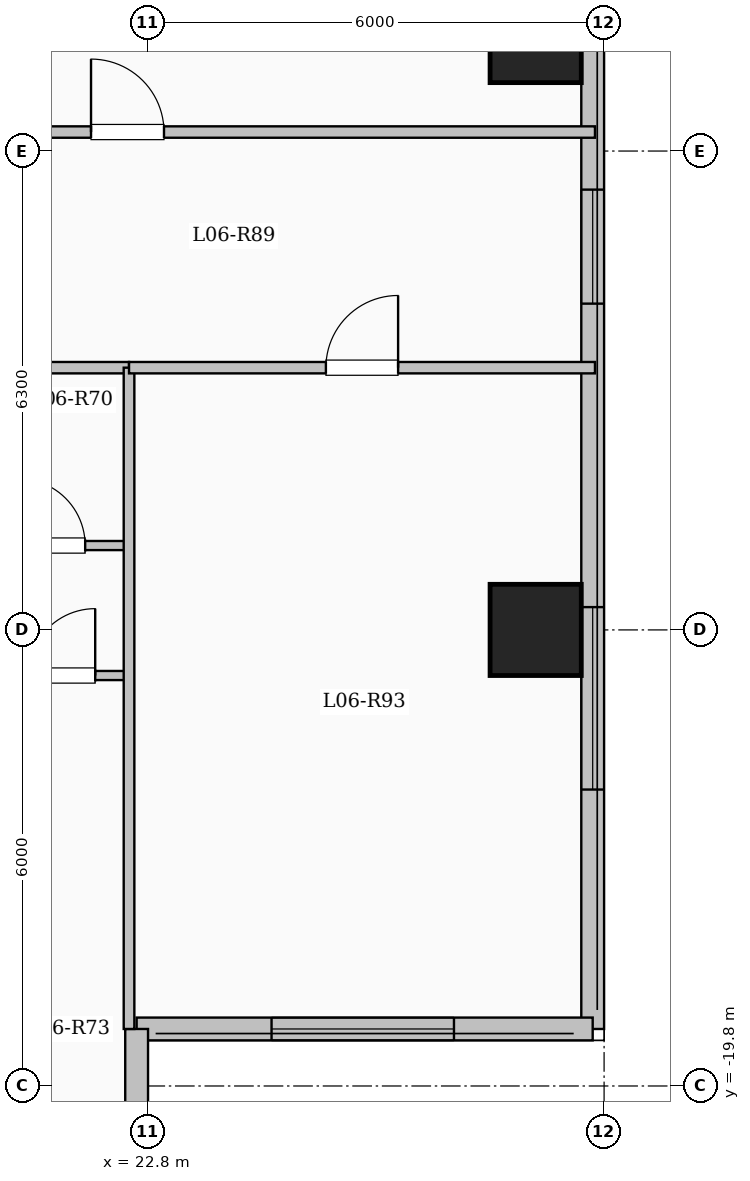
"""IFC4 building model, lengths in metres.
Left out: names, types, materials, properties, quantities, classifications, styles, units other than length and angle.
Written with IfcOpenShell. Run it as: python <this file> out.ifc"""

import sys

from ifc_helpers import new_model, si_unit, direction, frame, frame_2d, origin, origin_2d, place, context, subcontext, project, spatial, rectangle, extrude, element, fill, save


model = new_model("IFC4")
c1 = context("Model", 3, precision=1e-05, world=origin(), true_north=direction((0.0, 1.0)))
c2 = subcontext(c1, "Body", "Model", "MODEL_VIEW")
j1 = project(units=[si_unit("LENGTHUNIT", "METRE"), si_unit("PLANEANGLEUNIT", "RADIAN")], contexts=[c1])
p1 = place(None, origin())
s1 = spatial("IfcSite", under=j1, at=p1, CompositionType="ELEMENT")
p2 = place(p1, origin())
s2 = spatial("IfcBuilding", under=s1, at=p2, CompositionType="ELEMENT")
p3 = place(p2, frame((0.0, 0.0, 27.35)))
s3 = spatial("IfcBuildingStorey", under=s2, at=p3, CompositionType="ELEMENT", Elevation=27.35)
for number, where, z_axis, x_axis in (
    (1, (27.9, -13.8, 0.0), (0.0, 0.0, 1.0), (1.0, 0.0, 0.0)),
    (2, (27.9, -6.0, 0.0), (0.0, 0.0, 1.0), (1.0, 0.0, 0.0)),
):
    element("IfcColumn", number, at=place(p3, frame(where, z_axis=z_axis, x_axis=x_axis)), inside=s3, PredefinedType="COLUMN", context=c2, shape_type="SweptSolid", body=[
        extrude(rectangle(XDim=1.2, YDim=1.2, at=origin_2d()), origin(), (0.0, 0.0, 1.0), 3.35),
    ])
p4 = place(p3, frame((28.65, 19.05, 0.0), z_axis=(0.0, 0.0, 1.0), x_axis=(0.0, -1.0, 0.0)))
e3 = element("IfcWall", 3, at=p4, inside=s3, PredefinedType="SOLIDWALL", context=c2, shape_type="SweptSolid", body=[
    extrude(rectangle(XDim=38.1, YDim=0.3, at=frame_2d((19.05, 0.0))), origin(), (0.0, 0.0, 1.0), 3.1),
])
p5 = place(p4, frame((2.275, 0.0, 0.9)))
e4 = element("IfcOpeningElement", 4, at=p5, cuts=e3, PredefinedType="OPENING", context=c2, shape_type="SweptSolid", body=[
    extrude(rectangle(XDim=2.0, YDim=1.7, at=frame_2d((1.0, 0.85))), frame((0.0, 0.16, 0.0), z_axis=(0.0, -1.0, 0.0), x_axis=(1.0, 0.0, 0.0)), (0.0, 0.0, 1.0), 0.32),
])
p6 = place(p4, frame((6.925, 0.0, 0.95)))
e5 = element("IfcOpeningElement", 5, at=p6, cuts=e3, PredefinedType="OPENING", context=c2, shape_type="SweptSolid", body=[
    extrude(rectangle(XDim=1.0, YDim=1.5, at=frame_2d((0.5, 0.75))), frame((0.0, 0.16, 0.0), z_axis=(0.0, -1.0, 0.0), x_axis=(1.0, 0.0, 0.0)), (0.0, 0.0, 1.0), 0.32),
])
p7 = place(p4, frame((10.175, 0.0, 0.9)))
e6 = element("IfcOpeningElement", 6, at=p7, cuts=e3, PredefinedType="OPENING", context=c2, shape_type="SweptSolid", body=[
    extrude(rectangle(XDim=2.0, YDim=1.7, at=frame_2d((1.0, 0.85))), frame((0.0, 0.16, 0.0), z_axis=(0.0, -1.0, 0.0), x_axis=(1.0, 0.0, 0.0)), (0.0, 0.0, 1.0), 0.32),
])
p8 = place(p4, frame((14.925, 0.0, 0.9)))
e7 = element("IfcOpeningElement", 7, at=p8, cuts=e3, PredefinedType="OPENING", context=c2, shape_type="SweptSolid", body=[
    extrude(rectangle(XDim=1.8, YDim=1.65, at=frame_2d((0.9, 0.825))), frame((0.0, 0.16, 0.0), z_axis=(0.0, -1.0, 0.0), x_axis=(1.0, 0.0, 0.0)), (0.0, 0.0, 1.0), 0.32),
])
p9 = place(p4, frame((20.75, 0.0, 0.9)))
e8 = element("IfcOpeningElement", 8, at=p9, cuts=e3, PredefinedType="OPENING", context=c2, shape_type="SweptSolid", body=[
    extrude(rectangle(XDim=2.4, YDim=1.8, at=frame_2d((1.2, 0.9))), frame((0.0, 0.16, 0.0), z_axis=(0.0, -1.0, 0.0), x_axis=(1.0, 0.0, 0.0)), (0.0, 0.0, 1.0), 0.32),
])
p10 = place(p4, frame((27.058, 0.0, 0.9)))
e9 = element("IfcOpeningElement", 9, at=p10, cuts=e3, PredefinedType="OPENING", context=c2, shape_type="SweptSolid", body=[
    extrude(rectangle(XDim=1.5, YDim=1.65, at=frame_2d((0.75, 0.825))), frame((0.0, 0.16, 0.0), z_axis=(0.0, -1.0, 0.0), x_axis=(1.0, 0.0, 0.0)), (0.0, 0.0, 1.0), 0.32),
])
p11 = place(p4, frame((32.55, 0.0, 0.9)))
e10 = element("IfcOpeningElement", 10, at=p11, cuts=e3, PredefinedType="OPENING", context=c2, shape_type="SweptSolid", body=[
    extrude(rectangle(XDim=2.4, YDim=1.8, at=frame_2d((1.2, 0.9))), frame((0.0, 0.16, 0.0), z_axis=(0.0, -1.0, 0.0), x_axis=(1.0, 0.0, 0.0)), (0.0, 0.0, 1.0), 0.32),
])
p12 = place(p3, frame((28.65, -19.05, 0.0), z_axis=(0.0, 0.0, 1.0), x_axis=(-1.0, 0.0, 0.0)))
e11 = element("IfcWall", 11, at=p12, inside=s3, PredefinedType="SOLIDWALL", context=c2, shape_type="SweptSolid", body=[
    extrude(rectangle(XDim=6.0, YDim=0.3, at=frame_2d((3.0, 0.0))), origin(), (0.0, 0.0, 1.0), 3.1),
])
p13 = place(p12, frame((1.825, 0.0, 0.9)))
e12 = element("IfcOpeningElement", 12, at=p13, cuts=e11, PredefinedType="OPENING", context=c2, shape_type="SweptSolid", body=[
    extrude(rectangle(XDim=2.4, YDim=1.8, at=frame_2d((1.2, 0.9))), frame((0.0, 0.16, 0.0), z_axis=(0.0, -1.0, 0.0), x_axis=(1.0, 0.0, 0.0)), (0.0, 0.0, 1.0), 0.32),
])
p14 = place(p3, frame((22.65, -19.05, 0.0), z_axis=(0.0, 0.0, 1.0), x_axis=(0.0, -1.0, 0.0)))
e13 = element("IfcWall", 13, at=p14, inside=s3, PredefinedType="SOLIDWALL", context=c2, shape_type="SweptSolid", body=[
    extrude(rectangle(XDim=4.5, YDim=0.3, at=frame_2d((2.25, 0.0))), origin(), (0.0, 0.0, 1.0), 3.1),
])
p15 = place(p14, frame((1.333, 0.0, 0.9)))
e14 = element("IfcOpeningElement", 14, at=p15, cuts=e13, PredefinedType="OPENING", context=c2, shape_type="SweptSolid", body=[
    extrude(rectangle(XDim=1.8, YDim=1.65, at=frame_2d((0.9, 0.825))), frame((0.0, 0.16, 0.0), z_axis=(0.0, -1.0, 0.0), x_axis=(1.0, 0.0, 0.0)), (0.0, 0.0, 1.0), 0.32),
])
p16 = place(p3, frame((8.55, -10.35, 0.0), z_axis=(0.0, 0.0, 1.0), x_axis=(1.0, 0.0, 0.0)))
e15 = element("IfcWall", 15, at=p16, inside=s3, PredefinedType="PARTITIONING", context=c2, shape_type="SweptSolid", body=[
    extrude(rectangle(XDim=14.0, YDim=0.15, at=frame_2d((7.0, 0.0))), origin(), (0.0, 0.0, 1.0), 3.1),
])
p17 = place(p16, frame((0.75, 0.0, 0.0)))
e16 = element("IfcOpeningElement", 16, at=p17, cuts=e15, PredefinedType="OPENING", context=c2, shape_type="SweptSolid", body=[
    extrude(rectangle(XDim=0.96, YDim=2.15, at=frame_2d((0.48, 1.075))), frame((0.0, 0.085, 0.0), z_axis=(0.0, -1.0, 0.0), x_axis=(1.0, 0.0, 0.0)), (0.0, 0.0, 1.0), 0.17),
])
p18 = place(p16, frame((6.888, 0.0, 0.0)))
e17 = element("IfcOpeningElement", 17, at=p18, cuts=e15, PredefinedType="OPENING", context=c2, shape_type="SweptSolid", body=[
    extrude(rectangle(XDim=0.96, YDim=2.15, at=frame_2d((0.48, 1.075))), frame((0.0, 0.085, 0.0), z_axis=(0.0, -1.0, 0.0), x_axis=(1.0, 0.0, 0.0)), (0.0, 0.0, 1.0), 0.17),
])
p19 = place(p3, frame((20.515, -12.69, 0.0), z_axis=(0.0, 0.0, 1.0), x_axis=(1.0, 0.0, 0.0)))
e18 = element("IfcWall", 18, at=p19, inside=s3, PredefinedType="PARTITIONING", context=c2, shape_type="SweptSolid", body=[
    extrude(rectangle(XDim=2.035, YDim=0.12, at=frame_2d((1.018, 0.0))), origin(), (0.0, 0.0, 1.0), 3.1),
])
p20 = place(p19, frame((0.578, 0.0, 0.0)))
e19 = element("IfcOpeningElement", 19, at=p20, cuts=e18, PredefinedType="OPENING", context=c2, shape_type="SweptSolid", body=[
    extrude(rectangle(XDim=0.88, YDim=2.1, at=frame_2d((0.44, 1.05))), frame((0.0, 0.07, 0.0), z_axis=(0.0, -1.0, 0.0), x_axis=(1.0, 0.0, 0.0)), (0.0, 0.0, 1.0), 0.14),
])
p21 = place(p3, frame((17.838, -14.4, 0.0), z_axis=(0.0, 0.0, 1.0), x_axis=(1.0, 0.0, 0.0)))
e20 = element("IfcWall", 20, at=p21, inside=s3, PredefinedType="PARTITIONING", context=c2, shape_type="SweptSolid", body=[
    extrude(rectangle(XDim=4.772, YDim=0.12, at=frame_2d((2.386, 0.0))), origin(), (0.0, 0.0, 1.0), 3.1),
])
p22 = place(p21, frame((0.325, 0.0, 0.0)))
e21 = element("IfcOpeningElement", 21, at=p22, cuts=e20, PredefinedType="OPENING", context=c2, shape_type="SweptSolid", body=[
    extrude(rectangle(XDim=0.88, YDim=2.1, at=frame_2d((0.44, 1.05))), frame((0.0, 0.07, 0.0), z_axis=(0.0, -1.0, 0.0), x_axis=(1.0, 0.0, 0.0)), (0.0, 0.0, 1.0), 0.14),
])
p23 = place(p21, frame((1.856, 0.0, 0.0)))
e22 = element("IfcOpeningElement", 22, at=p23, cuts=e20, PredefinedType="OPENING", context=c2, shape_type="SweptSolid", body=[
    extrude(rectangle(XDim=0.88, YDim=2.1, at=frame_2d((0.44, 1.05))), frame((0.0, 0.07, 0.0), z_axis=(0.0, -1.0, 0.0), x_axis=(1.0, 0.0, 0.0)), (0.0, 0.0, 1.0), 0.14),
])
p24 = place(p21, frame((3.387, 0.0, 0.0)))
e23 = element("IfcOpeningElement", 23, at=p24, cuts=e20, PredefinedType="OPENING", context=c2, shape_type="SweptSolid", body=[
    extrude(rectangle(XDim=0.88, YDim=2.1, at=frame_2d((0.44, 1.05))), frame((0.0, 0.07, 0.0), z_axis=(0.0, -1.0, 0.0), x_axis=(1.0, 0.0, 0.0)), (0.0, 0.0, 1.0), 0.14),
])
p25 = place(p3, frame((21.15, -7.25, 0.0), z_axis=(0.0, 0.0, 1.0), x_axis=(1.0, 0.0, 0.0)))
e24 = element("IfcWall", 24, at=p25, inside=s3, PredefinedType="PARTITIONING", context=c2, shape_type="SweptSolid", body=[
    extrude(rectangle(XDim=7.53, YDim=0.15, at=frame_2d((3.765, 0.0))), origin(), (0.0, 0.0, 1.0), 3.1),
])
p26 = place(p25, frame((0.9, 0.0, 0.0)))
e25 = element("IfcOpeningElement", 25, at=p26, cuts=e24, PredefinedType="OPENING", context=c2, shape_type="SweptSolid", body=[
    extrude(rectangle(XDim=0.96, YDim=2.15, at=frame_2d((0.48, 1.075))), frame((0.0, 0.085, 0.0), z_axis=(0.0, -1.0, 0.0), x_axis=(1.0, 0.0, 0.0)), (0.0, 0.0, 1.0), 0.17),
])
p27 = place(p3, frame((22.55, -19.05, 0.0), z_axis=(0.0, 0.0, 1.0), x_axis=(0.0, 1.0, 0.0)))
e26 = element("IfcWall", 26, at=p27, inside=s3, PredefinedType="PARTITIONING", context=c2, shape_type="SweptSolid", body=[
    extrude(rectangle(XDim=8.7, YDim=0.14, at=frame_2d((4.35, 0.0))), origin(), (0.0, 0.0, 1.0), 3.1),
])
p28 = place(p3, frame((22.55, -10.35, 0.0), z_axis=(0.0, 0.0, 1.0), x_axis=(1.0, 0.0, 0.0)))
e27 = element("IfcWall", 27, at=p28, inside=s3, PredefinedType="PARTITIONING", context=c2, shape_type="SweptSolid", body=[
    extrude(rectangle(XDim=6.13, YDim=0.15, at=frame_2d((3.065, 0.0))), origin(), (0.0, 0.0, 1.0), 3.1),
])
p29 = place(p28, frame((2.59, 0.0, 0.0)))
e28 = element("IfcOpeningElement", 28, at=p29, cuts=e27, PredefinedType="OPENING", context=c2, shape_type="SweptSolid", body=[
    extrude(rectangle(XDim=0.95, YDim=2.15, at=frame_2d((0.475, 1.075))), frame((0.0, 0.085, 0.0), z_axis=(0.0, -1.0, 0.0), x_axis=(1.0, 0.0, 0.0)), (0.0, 0.0, 1.0), 0.17),
])
p30 = place(p10, origin())
e29 = element("IfcWindow", 29, at=p30, inside=s3, PartitioningType="SINGLE_PANEL", PredefinedType="WINDOW", context=c2, shape_type="SweptSolid", body=[
    extrude(rectangle(XDim=1.5, YDim=1.65, at=frame_2d((0.75, 0.825))), frame((0.0, 0.03, 0.0), z_axis=(0.0, -1.0, 0.0), x_axis=(1.0, 0.0, 0.0)), (0.0, 0.0, 1.0), 0.06),
])
fill(e9, e29)
p31 = place(p11, origin())
e30 = element("IfcWindow", 30, at=p31, inside=s3, PartitioningType="SINGLE_PANEL", PredefinedType="WINDOW", context=c2, shape_type="SweptSolid", body=[
    extrude(rectangle(XDim=2.4, YDim=1.8, at=frame_2d((1.2, 0.9))), frame((0.0, 0.03, 0.0), z_axis=(0.0, -1.0, 0.0), x_axis=(1.0, 0.0, 0.0)), (0.0, 0.0, 1.0), 0.06),
])
fill(e10, e30)
p32 = place(p13, origin())
e31 = element("IfcWindow", 31, at=p32, inside=s3, PartitioningType="SINGLE_PANEL", PredefinedType="WINDOW", context=c2, shape_type="SweptSolid", body=[
    extrude(rectangle(XDim=2.4, YDim=1.8, at=frame_2d((1.2, 0.9))), frame((0.0, 0.03, 0.0), z_axis=(0.0, -1.0, 0.0), x_axis=(1.0, 0.0, 0.0)), (0.0, 0.0, 1.0), 0.06),
])
fill(e12, e31)
p33 = place(p20, origin())
e32 = element("IfcDoor", 32, at=p33, inside=s3, OperationType="SINGLE_SWING_LEFT", PredefinedType="DOOR", context=c2, shape_type="SweptSolid", body=[
    extrude(rectangle(XDim=0.88, YDim=2.1, at=frame_2d((0.44, 1.05))), frame((0.0, 0.025, 0.0), z_axis=(0.0, -1.0, 0.0), x_axis=(1.0, 0.0, 0.0)), (0.0, 0.0, 1.0), 0.05),
])
fill(e19, e32)
p34 = place(p24, origin())
e33 = element("IfcDoor", 33, at=p34, inside=s3, OperationType="SINGLE_SWING_RIGHT", PredefinedType="DOOR", context=c2, shape_type="SweptSolid", body=[
    extrude(rectangle(XDim=0.88, YDim=2.1, at=frame_2d((0.44, 1.05))), frame((0.0, 0.025, 0.0), z_axis=(0.0, -1.0, 0.0), x_axis=(1.0, 0.0, 0.0)), (0.0, 0.0, 1.0), 0.05),
])
fill(e23, e33)
p35 = place(p29, origin())
e34 = element("IfcDoor", 34, at=p35, inside=s3, OperationType="SINGLE_SWING_RIGHT", PredefinedType="DOOR", context=c2, shape_type="SweptSolid", body=[
    extrude(rectangle(XDim=0.95, YDim=2.15, at=frame_2d((0.475, 1.075))), frame((0.0, 0.025, 0.0), z_axis=(0.0, -1.0, 0.0), x_axis=(1.0, 0.0, 0.0)), (0.0, 0.0, 1.0), 0.05),
])
fill(e28, e34)
p36 = place(p26, origin())
e35 = element("IfcDoor", 35, at=p36, inside=s3, OperationType="SINGLE_SWING_LEFT", PredefinedType="DOOR", context=c2, shape_type="SweptSolid", body=[
    extrude(rectangle(XDim=0.96, YDim=2.15, at=frame_2d((0.48, 1.075))), frame((0.0, 0.025, 0.0), z_axis=(0.0, -1.0, 0.0), x_axis=(1.0, 0.0, 0.0)), (0.0, 0.0, 1.0), 0.05),
])
fill(e25, e35)
save(model, sys.argv[1])
